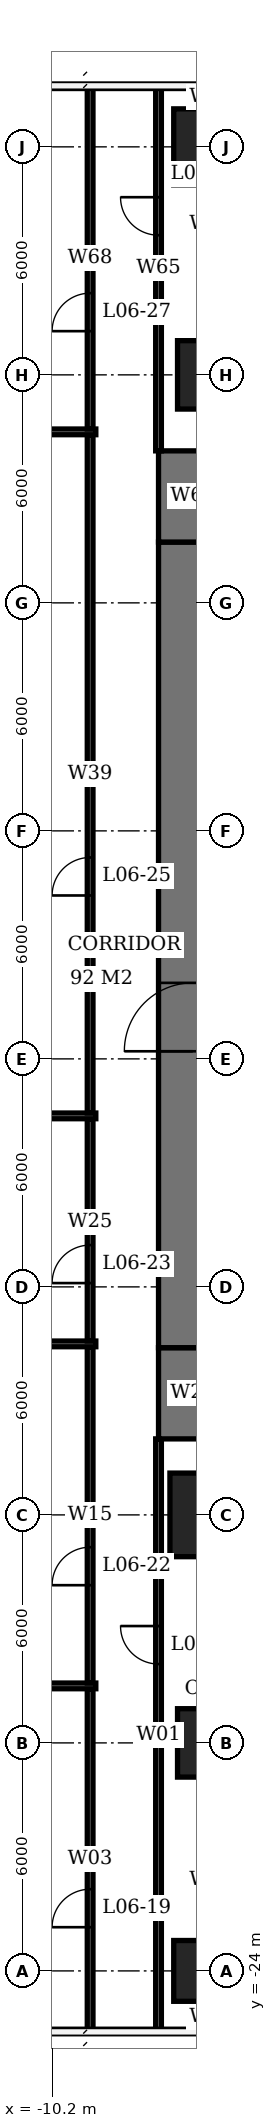
"""IFC4 building model, lengths in metres.
Left out: names, types, materials, properties, quantities, classifications, styles, units other than length and angle.
Written with IfcOpenShell. Run it as: python <this file> out.ifc"""

import sys

from ifc_helpers import new_model, si_unit, direction, frame, frame_2d, origin, origin_2d, place, context, subcontext, project, spatial, rectangle, extrude, element, fill, save


model = new_model("IFC4")
c1 = context("Model", 3, precision=1e-05, world=origin(), true_north=direction((0.0, 1.0)))
c2 = subcontext(c1, "Body", "Model", "MODEL_VIEW")
j1 = project(units=[si_unit("LENGTHUNIT", "METRE"), si_unit("PLANEANGLEUNIT", "RADIAN")], contexts=[c1])
p1 = place(None, origin())
s1 = spatial("IfcSite", under=j1, at=p1, CompositionType="ELEMENT")
p2 = place(p1, origin())
s2 = spatial("IfcBuilding", under=s1, at=p2, CompositionType="ELEMENT")
p3 = place(p2, frame((0.0, 0.0, 29.9)))
s3 = spatial("IfcBuildingStorey", under=s2, at=p3, CompositionType="ELEMENT", Elevation=29.9)
p4 = place(p3, frame((-6.0, -24.0, 0.0), z_axis=(0.0, 0.0, 1.0), x_axis=(1.0, 0.0, 0.0)))
e1 = element("IfcColumn", 1, at=p4, inside=s3, PredefinedType="COLUMN", context=c2, shape_type="SweptSolid", body=[
    extrude(rectangle(XDim=2.0, YDim=1.6, at=origin_2d()), origin(), (0.0, 0.0, 1.0), 3.9),
])
p5 = place(p3, frame((-6.0, -18.0, 0.0), z_axis=(0.0, 0.0, 1.0), x_axis=(1.0, 0.0, 0.0)))
e2 = element("IfcColumn", 2, at=p5, inside=s3, PredefinedType="COLUMN", context=c2, shape_type="SweptSolid", body=[
    extrude(rectangle(XDim=1.8, YDim=1.8, at=origin_2d()), origin(), (0.0, 0.0, 1.0), 3.9),
])
p6 = place(p3, frame((-6.0, -12.0, 0.0), z_axis=(0.0, 0.0, 1.0), x_axis=(1.0, 0.0, 0.0)))
e3 = element("IfcColumn", 3, at=p6, inside=s3, PredefinedType="COLUMN", context=c2, shape_type="SweptSolid", body=[
    extrude(rectangle(XDim=2.2, YDim=2.2, at=origin_2d()), origin(), (0.0, 0.0, 1.0), 3.9),
])
p7 = place(p3, frame((-6.0, 18.0, 0.0), z_axis=(0.0, 0.0, 1.0), x_axis=(1.0, 0.0, 0.0)))
e4 = element("IfcColumn", 4, at=p7, inside=s3, PredefinedType="COLUMN", context=c2, shape_type="SweptSolid", body=[
    extrude(rectangle(XDim=1.8, YDim=1.8, at=origin_2d()), origin(), (0.0, 0.0, 1.0), 3.9),
])
p8 = place(p3, frame((-6.0, 24.0, 0.0), z_axis=(0.0, 0.0, 1.0), x_axis=(1.0, 0.0, 0.0)))
e5 = element("IfcColumn", 5, at=p8, inside=s3, PredefinedType="COLUMN", context=c2, shape_type="SweptSolid", body=[
    extrude(rectangle(XDim=2.0, YDim=2.0, at=origin_2d()), origin(), (0.0, 0.0, 1.0), 3.9),
])
p9 = place(p3, frame((-6.5, -7.6, 0.0), z_axis=(0.0, 0.0, 1.0), x_axis=(0.0, 1.0, 0.0)))
e6 = element("IfcWall", 6, at=p9, inside=s3, PredefinedType="SHEAR", context=c2, shape_type="SweptSolid", body=[
    extrude(rectangle(XDim=21.2, YDim=1.8, at=frame_2d((10.6, 0.0))), origin(), (0.0, 0.0, 1.0), 3.9),
])
p10 = place(p9, frame((7.8, 0.0, 0.0)))
e7 = element("IfcOpeningElement", 7, at=p10, cuts=e6, PredefinedType="OPENING", context=c2, shape_type="SweptSolid", body=[
    extrude(rectangle(XDim=1.8, YDim=2.4, at=frame_2d((0.9, 1.2))), frame((0.0, 0.91, 0.0), z_axis=(0.0, -1.0, 0.0), x_axis=(1.0, 0.0, 0.0)), (0.0, 0.0, 1.0), 1.82),
])
for number, where, z_axis, x_axis in (
    (8, (-6.5, -10.0, 0.0), (0.0, 0.0, 1.0), (0.0, 1.0, 0.0)),
    (9, (-6.5, 13.6, 0.0), (0.0, 0.0, 1.0), (0.0, 1.0, 0.0)),
):
    element("IfcWall", number, at=place(p3, frame(where, z_axis=z_axis, x_axis=x_axis)), inside=s3, PredefinedType="SHEAR", context=c2, shape_type="SweptSolid", body=[
        extrude(rectangle(XDim=2.4, YDim=1.8, at=frame_2d((1.2, 0.0))), origin(), (0.0, 0.0, 1.0), 3.9),
    ])
p11 = place(p3, frame((-25.6, 16.5, 0.0), z_axis=(0.0, 0.0, 1.0), x_axis=(1.0, 0.0, 0.0)))
e10 = element("IfcWall", 10, at=p11, inside=s3, PredefinedType="PARTITIONING", context=c2, shape_type="SweptSolid", body=[
    extrude(rectangle(XDim=16.55, YDim=0.15, at=frame_2d((8.275, 0.0))), origin(), (0.0, 0.0, 1.0), 3.65),
])
p12 = place(p3, frame((-20.025, -1.5, 0.0), z_axis=(0.0, 0.0, 1.0), x_axis=(1.0, 0.0, 0.0)))
e11 = element("IfcWall", 11, at=p12, inside=s3, PredefinedType="PARTITIONING", context=c2, shape_type="SweptSolid", body=[
    extrude(rectangle(XDim=10.975, YDim=0.15, at=frame_2d((5.487, 0.0))), origin(), (0.0, 0.0, 1.0), 3.65),
])
p13 = place(p3, frame((-19.725, -16.5, 0.0), z_axis=(0.0, 0.0, 1.0), x_axis=(1.0, 0.0, 0.0)))
e12 = element("IfcWall", 12, at=p13, inside=s3, PredefinedType="PARTITIONING", context=c2, shape_type="SweptSolid", body=[
    extrude(rectangle(XDim=10.675, YDim=0.15, at=frame_2d((5.337, 0.0))), origin(), (0.0, 0.0, 1.0), 3.65),
])
p14 = place(p3, frame((-18.525, -7.5, 0.0), z_axis=(0.0, 0.0, 1.0), x_axis=(1.0, 0.0, 0.0)))
e13 = element("IfcWall", 13, at=p14, inside=s3, PredefinedType="PARTITIONING", context=c2, shape_type="SweptSolid", body=[
    extrude(rectangle(XDim=9.475, YDim=0.15, at=frame_2d((4.737, 0.0))), origin(), (0.0, 0.0, 1.0), 3.65),
])
p15 = place(p3, frame((-9.2, -25.55, 0.0), z_axis=(0.0, 0.0, 1.0), x_axis=(0.0, 1.0, 0.0)))
e14 = element("IfcWall", 14, at=p15, inside=s3, PredefinedType="PARTITIONING", context=c2, shape_type="SweptSolid", body=[
    extrude(rectangle(XDim=8.975, YDim=0.15, at=frame_2d((4.488, 0.0))), origin(), (0.0, 0.0, 1.0), 3.65),
])
p16 = place(p15, frame((2.7, 0.0, 0.0)))
e15 = element("IfcOpeningElement", 15, at=p16, cuts=e14, PredefinedType="OPENING", context=c2, shape_type="SweptSolid", body=[
    extrude(rectangle(XDim=1.0, YDim=2.1, at=frame_2d((0.5, 1.05))), frame((0.0, 0.085, 0.0), z_axis=(0.0, -1.0, 0.0), x_axis=(1.0, 0.0, 0.0)), (0.0, 0.0, 1.0), 0.17),
])
p17 = place(p3, frame((-9.2, -16.425, 0.0), z_axis=(0.0, 0.0, 1.0), x_axis=(0.0, 1.0, 0.0)))
e16 = element("IfcWall", 16, at=p17, inside=s3, PredefinedType="PARTITIONING", context=c2, shape_type="SweptSolid", body=[
    extrude(rectangle(XDim=8.85, YDim=0.15, at=frame_2d((4.425, 0.0))), origin(), (0.0, 0.0, 1.0), 3.65),
])
p18 = place(p17, frame((2.575, 0.0, 0.0)))
e17 = element("IfcOpeningElement", 17, at=p18, cuts=e16, PredefinedType="OPENING", context=c2, shape_type="SweptSolid", body=[
    extrude(rectangle(XDim=1.0, YDim=2.1, at=frame_2d((0.5, 1.05))), frame((0.0, 0.085, 0.0), z_axis=(0.0, -1.0, 0.0), x_axis=(1.0, 0.0, 0.0)), (0.0, 0.0, 1.0), 0.17),
])
p19 = place(p3, frame((-9.2, -7.425, 0.0), z_axis=(0.0, 0.0, 1.0), x_axis=(0.0, 1.0, 0.0)))
e18 = element("IfcWall", 18, at=p19, inside=s3, PredefinedType="PARTITIONING", context=c2, shape_type="SweptSolid", body=[
    extrude(rectangle(XDim=5.85, YDim=0.15, at=frame_2d((2.925, 0.0))), origin(), (0.0, 0.0, 1.0), 3.65),
])
p20 = place(p19, frame((1.525, 0.0, 0.0)))
e19 = element("IfcOpeningElement", 19, at=p20, cuts=e18, PredefinedType="OPENING", context=c2, shape_type="SweptSolid", body=[
    extrude(rectangle(XDim=1.0, YDim=2.1, at=frame_2d((0.5, 1.05))), frame((0.0, 0.085, 0.0), z_axis=(0.0, -1.0, 0.0), x_axis=(1.0, 0.0, 0.0)), (0.0, 0.0, 1.0), 0.17),
])
p21 = place(p3, frame((-9.2, -1.425, 0.0), z_axis=(0.0, 0.0, 1.0), x_axis=(0.0, 1.0, 0.0)))
e20 = element("IfcWall", 20, at=p21, inside=s3, PredefinedType="PARTITIONING", context=c2, shape_type="SweptSolid", body=[
    extrude(rectangle(XDim=17.85, YDim=0.15, at=frame_2d((8.925, 0.0))), origin(), (0.0, 0.0, 1.0), 3.65),
])
p22 = place(p21, frame((5.725, 0.0, 0.0)))
e21 = element("IfcOpeningElement", 21, at=p22, cuts=e20, PredefinedType="OPENING", context=c2, shape_type="SweptSolid", body=[
    extrude(rectangle(XDim=1.0, YDim=2.1, at=frame_2d((0.5, 1.05))), frame((0.0, 0.085, 0.0), z_axis=(0.0, -1.0, 0.0), x_axis=(1.0, 0.0, 0.0)), (0.0, 0.0, 1.0), 0.17),
])
p23 = place(p3, frame((-9.2, 16.575, 0.0), z_axis=(0.0, 0.0, 1.0), x_axis=(0.0, 1.0, 0.0)))
e22 = element("IfcWall", 22, at=p23, inside=s3, PredefinedType="PARTITIONING", context=c2, shape_type="SweptSolid", body=[
    extrude(rectangle(XDim=8.975, YDim=0.15, at=frame_2d((4.488, 0.0))), origin(), (0.0, 0.0, 1.0), 3.65),
])
p24 = place(p23, frame((2.575, 0.0, 0.0)))
e23 = element("IfcOpeningElement", 23, at=p24, cuts=e22, PredefinedType="OPENING", context=c2, shape_type="SweptSolid", body=[
    extrude(rectangle(XDim=1.0, YDim=2.1, at=frame_2d((0.5, 1.05))), frame((0.0, 0.085, 0.0), z_axis=(0.0, -1.0, 0.0), x_axis=(1.0, 0.0, 0.0)), (0.0, 0.0, 1.0), 0.17),
])
p25 = place(p3, frame((-7.4, -25.6, 0.0), z_axis=(0.0, 0.0, 1.0), x_axis=(0.0, 1.0, 0.0)))
e24 = element("IfcWall", 24, at=p25, inside=s3, PredefinedType="PARTITIONING", context=c2, shape_type="SweptSolid", body=[
    extrude(rectangle(XDim=15.6, YDim=0.15, at=frame_2d((7.8, 0.0))), origin(), (0.0, 0.0, 1.0), 3.65),
])
p26 = place(p25, frame((9.675, 0.0, 0.0)))
e25 = element("IfcOpeningElement", 25, at=p26, cuts=e24, PredefinedType="OPENING", context=c2, shape_type="SweptSolid", body=[
    extrude(rectangle(XDim=1.0, YDim=2.1, at=frame_2d((0.5, 1.05))), frame((0.0, 0.085, 0.0), z_axis=(0.0, -1.0, 0.0), x_axis=(1.0, 0.0, 0.0)), (0.0, 0.0, 1.0), 0.17),
])
p27 = place(p3, frame((-7.4, 16.0, 0.0), z_axis=(0.0, 0.0, 1.0), x_axis=(0.0, 1.0, 0.0)))
e26 = element("IfcWall", 26, at=p27, inside=s3, PredefinedType="PARTITIONING", context=c2, shape_type="SweptSolid", body=[
    extrude(rectangle(XDim=9.6, YDim=0.15, at=frame_2d((4.8, 0.0))), origin(), (0.0, 0.0, 1.0), 3.65),
])
p28 = place(p27, frame((5.675, 0.0, 0.0)))
e27 = element("IfcOpeningElement", 27, at=p28, cuts=e26, PredefinedType="OPENING", context=c2, shape_type="SweptSolid", body=[
    extrude(rectangle(XDim=1.0, YDim=2.1, at=frame_2d((0.5, 1.05))), frame((0.0, 0.085, 0.0), z_axis=(0.0, -1.0, 0.0), x_axis=(1.0, 0.0, 0.0)), (0.0, 0.0, 1.0), 0.17),
])
p29 = place(p10, origin())
e28 = element("IfcDoor", 28, at=p29, inside=s3, OperationType="DOUBLE_DOOR_SINGLE_SWING", PredefinedType="DOOR", context=c2, shape_type="SweptSolid", body=[
    extrude(rectangle(XDim=1.8, YDim=2.4, at=frame_2d((0.9, 1.2))), frame((0.0, 0.025, 0.0), z_axis=(0.0, -1.0, 0.0), x_axis=(1.0, 0.0, 0.0)), (0.0, 0.0, 1.0), 0.05),
])
fill(e7, e28)
p30 = place(p16, origin())
e29 = element("IfcDoor", 29, at=p30, inside=s3, OperationType="SINGLE_SWING_LEFT", PredefinedType="DOOR", context=c2, shape_type="SweptSolid", body=[
    extrude(rectangle(XDim=1.0, YDim=2.1, at=frame_2d((0.5, 1.05))), frame((0.0, 0.025, 0.0), z_axis=(0.0, -1.0, 0.0), x_axis=(1.0, 0.0, 0.0)), (0.0, 0.0, 1.0), 0.05),
])
fill(e15, e29)
p31 = place(p26, origin())
e30 = element("IfcDoor", 30, at=p31, inside=s3, OperationType="SINGLE_SWING_RIGHT", PredefinedType="DOOR", context=c2, shape_type="SweptSolid", body=[
    extrude(rectangle(XDim=1.0, YDim=2.1, at=frame_2d((0.5, 1.05))), frame((0.0, 0.025, 0.0), z_axis=(0.0, -1.0, 0.0), x_axis=(1.0, 0.0, 0.0)), (0.0, 0.0, 1.0), 0.05),
])
fill(e25, e30)
p32 = place(p18, origin())
e31 = element("IfcDoor", 31, at=p32, inside=s3, OperationType="SINGLE_SWING_LEFT", PredefinedType="DOOR", context=c2, shape_type="SweptSolid", body=[
    extrude(rectangle(XDim=1.0, YDim=2.1, at=frame_2d((0.5, 1.05))), frame((0.0, 0.025, 0.0), z_axis=(0.0, -1.0, 0.0), x_axis=(1.0, 0.0, 0.0)), (0.0, 0.0, 1.0), 0.05),
])
fill(e17, e31)
p33 = place(p20, origin())
e32 = element("IfcDoor", 32, at=p33, inside=s3, OperationType="SINGLE_SWING_LEFT", PredefinedType="DOOR", context=c2, shape_type="SweptSolid", body=[
    extrude(rectangle(XDim=1.0, YDim=2.1, at=frame_2d((0.5, 1.05))), frame((0.0, 0.025, 0.0), z_axis=(0.0, -1.0, 0.0), x_axis=(1.0, 0.0, 0.0)), (0.0, 0.0, 1.0), 0.05),
])
fill(e19, e32)
p34 = place(p22, origin())
e33 = element("IfcDoor", 33, at=p34, inside=s3, OperationType="SINGLE_SWING_LEFT", PredefinedType="DOOR", context=c2, shape_type="SweptSolid", body=[
    extrude(rectangle(XDim=1.0, YDim=2.1, at=frame_2d((0.5, 1.05))), frame((0.0, 0.025, 0.0), z_axis=(0.0, -1.0, 0.0), x_axis=(1.0, 0.0, 0.0)), (0.0, 0.0, 1.0), 0.05),
])
fill(e21, e33)
p35 = place(p28, origin())
e34 = element("IfcDoor", 34, at=p35, inside=s3, OperationType="SINGLE_SWING_RIGHT", PredefinedType="DOOR", context=c2, shape_type="SweptSolid", body=[
    extrude(rectangle(XDim=1.0, YDim=2.1, at=frame_2d((0.5, 1.05))), frame((0.0, 0.025, 0.0), z_axis=(0.0, -1.0, 0.0), x_axis=(1.0, 0.0, 0.0)), (0.0, 0.0, 1.0), 0.05),
])
fill(e27, e34)
p36 = place(p24, origin())
e35 = element("IfcDoor", 35, at=p36, inside=s3, OperationType="SINGLE_SWING_LEFT", PredefinedType="DOOR", context=c2, shape_type="SweptSolid", body=[
    extrude(rectangle(XDim=1.0, YDim=2.1, at=frame_2d((0.5, 1.05))), frame((0.0, 0.025, 0.0), z_axis=(0.0, -1.0, 0.0), x_axis=(1.0, 0.0, 0.0)), (0.0, 0.0, 1.0), 0.05),
])
fill(e23, e35)
save(model, sys.argv[1])
